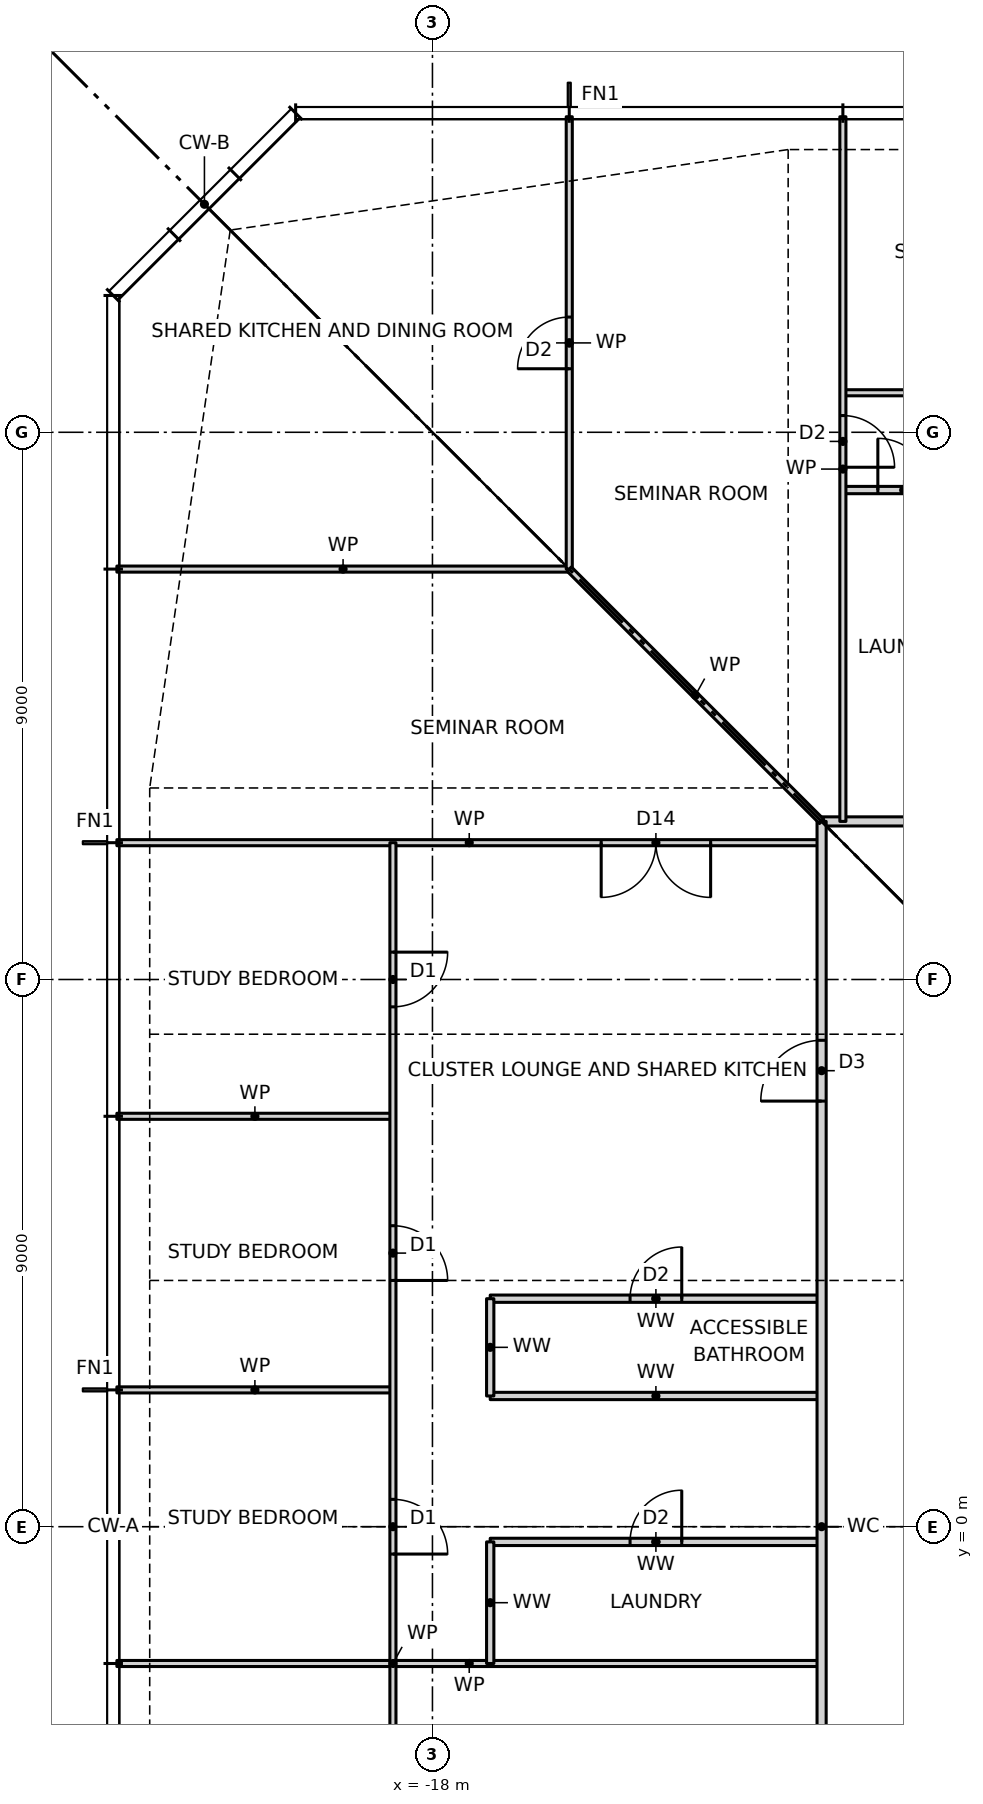
"""IFC4 building model, lengths in metres.
Left out: names, types, materials, properties, quantities, classifications, styles, units other than length and angle.
Written with IfcOpenShell. Run it as: python <this file> out.ifc"""

import sys

from ifc_helpers import new_model, si_unit, direction, frame, frame_2d, origin, place, context, subcontext, project, spatial, rectangle, extrude, element, fill, save


model = new_model("IFC4")
c1 = context("Model", 3, precision=1e-05, world=origin(), true_north=direction((0.0, 1.0)))
c2 = subcontext(c1, "Body", "Model", "MODEL_VIEW")
j1 = project(units=[si_unit("LENGTHUNIT", "METRE"), si_unit("PLANEANGLEUNIT", "RADIAN")], contexts=[c1])
p1 = place(None, origin())
s1 = spatial("IfcSite", under=j1, at=p1, CompositionType="ELEMENT")
p2 = place(p1, origin())
s2 = spatial("IfcBuilding", under=s1, at=p2, CompositionType="ELEMENT")
p3 = place(p2, frame((0.0, 0.0, 71.0)))
s3 = spatial("IfcBuildingStorey", under=s2, at=p3, CompositionType="ELEMENT", Elevation=71.0)
p4 = place(p3, frame((-23.19, -2.25, 0.0), z_axis=(0.0, 0.0, 1.0), x_axis=(1.0, 0.0, 0.0)))
e1 = element("IfcWall", 1, at=p4, inside=s3, PredefinedType="PARTITIONING", context=c2, shape_type="SweptSolid", body=[
    extrude(rectangle(XDim=11.59, YDim=0.1, at=frame_2d((5.795, 0.0))), origin(), (0.0, 0.0, 1.0), 3.2),
])
p5 = place(p3, frame((-17.05, -0.25, 0.0), z_axis=(0.0, 0.0, 1.0), x_axis=(1.0, 0.0, 0.0)))
e2 = element("IfcWall", 2, at=p5, inside=s3, PredefinedType="PARTITIONING", context=c2, shape_type="SweptSolid", body=[
    extrude(rectangle(XDim=5.45, YDim=0.12, at=frame_2d((2.725, 0.0))), origin(), (0.0, 0.0, 1.0), 3.2),
])
p6 = place(p5, frame((2.3, 0.0, 0.0)))
e3 = element("IfcOpeningElement", 3, at=p6, cuts=e2, PredefinedType="OPENING", context=c2, shape_type="SweptSolid", body=[
    extrude(rectangle(XDim=0.85, YDim=2.1, at=frame_2d((0.425, 1.05))), frame((0.0, 0.07, 0.0), z_axis=(0.0, -1.0, 0.0), x_axis=(1.0, 0.0, 0.0)), (0.0, 0.0, 1.0), 0.14),
])
p7 = place(p3, frame((-17.05, 2.15, 0.0), z_axis=(0.0, 0.0, 1.0), x_axis=(1.0, 0.0, 0.0)))
e4 = element("IfcWall", 4, at=p7, inside=s3, PredefinedType="PARTITIONING", context=c2, shape_type="SweptSolid", body=[
    extrude(rectangle(XDim=5.45, YDim=0.12, at=frame_2d((2.725, 0.0))), origin(), (0.0, 0.0, 1.0), 3.2),
])
p8 = place(p3, frame((-23.19, 2.25, 0.0), z_axis=(0.0, 0.0, 1.0), x_axis=(1.0, 0.0, 0.0)))
e5 = element("IfcWall", 5, at=p8, inside=s3, PredefinedType="PARTITIONING", context=c2, shape_type="SweptSolid", body=[
    extrude(rectangle(XDim=4.54, YDim=0.1, at=frame_2d((2.27, 0.0))), origin(), (0.0, 0.0, 1.0), 3.2),
])
p9 = place(p3, frame((-17.05, 3.75, 0.0), z_axis=(0.0, 0.0, 1.0), x_axis=(1.0, 0.0, 0.0)))
e6 = element("IfcWall", 6, at=p9, inside=s3, PredefinedType="PARTITIONING", context=c2, shape_type="SweptSolid", body=[
    extrude(rectangle(XDim=5.45, YDim=0.12, at=frame_2d((2.725, 0.0))), origin(), (0.0, 0.0, 1.0), 3.2),
])
p10 = place(p9, frame((2.3, 0.0, 0.0)))
e7 = element("IfcOpeningElement", 7, at=p10, cuts=e6, PredefinedType="OPENING", context=c2, shape_type="SweptSolid", body=[
    extrude(rectangle(XDim=0.85, YDim=2.1, at=frame_2d((0.425, 1.05))), frame((0.0, 0.07, 0.0), z_axis=(0.0, -1.0, 0.0), x_axis=(1.0, 0.0, 0.0)), (0.0, 0.0, 1.0), 0.14),
])
p11 = place(p3, frame((-23.19, 6.75, 0.0), z_axis=(0.0, 0.0, 1.0), x_axis=(1.0, 0.0, 0.0)))
e8 = element("IfcWall", 8, at=p11, inside=s3, PredefinedType="PARTITIONING", context=c2, shape_type="SweptSolid", body=[
    extrude(rectangle(XDim=4.54, YDim=0.1, at=frame_2d((2.27, 0.0))), origin(), (0.0, 0.0, 1.0), 3.2),
])
p12 = place(p3, frame((-23.19, 11.25, 0.0), z_axis=(0.0, 0.0, 1.0), x_axis=(1.0, 0.0, 0.0)))
e9 = element("IfcWall", 9, at=p12, inside=s3, PredefinedType="PARTITIONING", context=c2, shape_type="SweptSolid", body=[
    extrude(rectangle(XDim=11.59, YDim=0.1, at=frame_2d((5.795, 0.0))), origin(), (0.0, 0.0, 1.0), 3.2),
])
p13 = place(p12, frame((7.965, 0.0, 0.0)))
e10 = element("IfcOpeningElement", 10, at=p13, cuts=e9, PredefinedType="OPENING", context=c2, shape_type="SweptSolid", body=[
    extrude(rectangle(XDim=1.8, YDim=2.1, at=frame_2d((0.9, 1.05))), frame((0.0, 0.06, 0.0), z_axis=(0.0, -1.0, 0.0), x_axis=(1.0, 0.0, 0.0)), (0.0, 0.0, 1.0), 0.12),
])
p14 = place(p3, frame((-11.6, 11.6, 0.0), z_axis=(0.0, 0.0, 1.0), x_axis=(1.0, 0.0, 0.0)))
e11 = element("IfcWall", 11, at=p14, inside=s3, PredefinedType="PARTITIONING", context=c2, shape_type="SweptSolid", body=[
    extrude(rectangle(XDim=24.2, YDim=0.15, at=frame_2d((12.1, 0.0))), origin(), (0.0, 0.0, 1.0), 3.2),
])
p15 = place(p14, frame((6.15, 0.0, 0.0)))
e12 = element("IfcOpeningElement", 12, at=p15, cuts=e11, PredefinedType="OPENING", context=c2, shape_type="SweptSolid", body=[
    extrude(rectangle(XDim=1.0, YDim=2.1, at=frame_2d((0.5, 1.05))), frame((0.0, 0.085, 0.0), z_axis=(0.0, -1.0, 0.0), x_axis=(1.0, 0.0, 0.0)), (0.0, 0.0, 1.0), 0.17),
])
p16 = place(p3, frame((-23.19, 15.75, 0.0), z_axis=(0.0, 0.0, 1.0), x_axis=(1.0, 0.0, 0.0)))
e13 = element("IfcWall", 13, at=p16, inside=s3, PredefinedType="PARTITIONING", context=c2, shape_type="SweptSolid", body=[
    extrude(rectangle(XDim=7.44, YDim=0.1, at=frame_2d((3.72, 0.0))), origin(), (0.0, 0.0, 1.0), 3.2),
])
p17 = place(p3, frame((-11.25, 17.05, 0.0), z_axis=(0.0, 0.0, 1.0), x_axis=(1.0, 0.0, 0.0)))
e14 = element("IfcWall", 14, at=p17, inside=s3, PredefinedType="PARTITIONING", context=c2, shape_type="SweptSolid", body=[
    extrude(rectangle(XDim=5.1, YDim=0.12, at=frame_2d((2.55, 0.0))), origin(), (0.0, 0.0, 1.0), 3.2),
])
p18 = place(p17, frame((2.375, 0.0, 0.0)))
e15 = element("IfcOpeningElement", 15, at=p18, cuts=e14, PredefinedType="OPENING", context=c2, shape_type="SweptSolid", body=[
    extrude(rectangle(XDim=0.85, YDim=2.1, at=frame_2d((0.425, 1.05))), frame((0.0, 0.07, 0.0), z_axis=(0.0, -1.0, 0.0), x_axis=(1.0, 0.0, 0.0)), (0.0, 0.0, 1.0), 0.14),
])
p19 = place(p17, frame((0.575, 0.0, 0.0)))
e16 = element("IfcOpeningElement", 16, at=p19, cuts=e14, PredefinedType="OPENING", context=c2, shape_type="SweptSolid", body=[
    extrude(rectangle(XDim=0.85, YDim=2.1, at=frame_2d((0.425, 1.05))), frame((0.0, 0.07, 0.0), z_axis=(0.0, -1.0, 0.0), x_axis=(1.0, 0.0, 0.0)), (0.0, 0.0, 1.0), 0.14),
])
p20 = place(p3, frame((-11.25, 18.65, 0.0), z_axis=(0.0, 0.0, 1.0), x_axis=(1.0, 0.0, 0.0)))
e17 = element("IfcWall", 17, at=p20, inside=s3, PredefinedType="PARTITIONING", context=c2, shape_type="SweptSolid", body=[
    extrude(rectangle(XDim=27.0, YDim=0.1, at=frame_2d((13.5, 0.0))), origin(), (0.0, 0.0, 1.0), 3.2),
])
p21 = place(p20, frame((24.3, 0.0, 0.0)))
e18 = element("IfcOpeningElement", 18, at=p21, cuts=e17, PredefinedType="OPENING", context=c2, shape_type="SweptSolid", body=[
    extrude(rectangle(XDim=0.9, YDim=2.1, at=frame_2d((0.45, 1.05))), frame((0.0, 0.06, 0.0), z_axis=(0.0, -1.0, 0.0), x_axis=(1.0, 0.0, 0.0)), (0.0, 0.0, 1.0), 0.12),
])
p22 = place(p20, frame((19.8, 0.0, 0.0)))
e19 = element("IfcOpeningElement", 19, at=p22, cuts=e17, PredefinedType="OPENING", context=c2, shape_type="SweptSolid", body=[
    extrude(rectangle(XDim=0.9, YDim=2.1, at=frame_2d((0.45, 1.05))), frame((0.0, 0.06, 0.0), z_axis=(0.0, -1.0, 0.0), x_axis=(1.0, 0.0, 0.0)), (0.0, 0.0, 1.0), 0.12),
])
p23 = place(p20, frame((15.3, 0.0, 0.0)))
e20 = element("IfcOpeningElement", 20, at=p23, cuts=e17, PredefinedType="OPENING", context=c2, shape_type="SweptSolid", body=[
    extrude(rectangle(XDim=0.9, YDim=2.1, at=frame_2d((0.45, 1.05))), frame((0.0, 0.06, 0.0), z_axis=(0.0, -1.0, 0.0), x_axis=(1.0, 0.0, 0.0)), (0.0, 0.0, 1.0), 0.12),
])
p24 = place(p20, frame((10.8, 0.0, 0.0)))
e21 = element("IfcOpeningElement", 21, at=p24, cuts=e17, PredefinedType="OPENING", context=c2, shape_type="SweptSolid", body=[
    extrude(rectangle(XDim=0.9, YDim=2.1, at=frame_2d((0.45, 1.05))), frame((0.0, 0.06, 0.0), z_axis=(0.0, -1.0, 0.0), x_axis=(1.0, 0.0, 0.0)), (0.0, 0.0, 1.0), 0.12),
])
p25 = place(p20, frame((6.3, 0.0, 0.0)))
e22 = element("IfcOpeningElement", 22, at=p25, cuts=e17, PredefinedType="OPENING", context=c2, shape_type="SweptSolid", body=[
    extrude(rectangle(XDim=0.9, YDim=2.1, at=frame_2d((0.45, 1.05))), frame((0.0, 0.06, 0.0), z_axis=(0.0, -1.0, 0.0), x_axis=(1.0, 0.0, 0.0)), (0.0, 0.0, 1.0), 0.12),
])
p26 = place(p20, frame((1.8, 0.0, 0.0)))
e23 = element("IfcOpeningElement", 23, at=p26, cuts=e17, PredefinedType="OPENING", context=c2, shape_type="SweptSolid", body=[
    extrude(rectangle(XDim=0.9, YDim=2.1, at=frame_2d((0.45, 1.05))), frame((0.0, 0.06, 0.0), z_axis=(0.0, -1.0, 0.0), x_axis=(1.0, 0.0, 0.0)), (0.0, 0.0, 1.0), 0.12),
])
p27 = place(p3, frame((-11.25, 11.6, 0.0), z_axis=(0.0, 0.0, 1.0), x_axis=(0.0, 1.0, 0.0)))
e24 = element("IfcWall", 24, at=p27, inside=s3, PredefinedType="PARTITIONING", context=c2, shape_type="SweptSolid", body=[
    extrude(rectangle(XDim=11.59, YDim=0.1, at=frame_2d((5.795, 0.0))), origin(), (0.0, 0.0, 1.0), 3.2),
])
p28 = place(p27, frame((5.825, 0.0, 0.0)))
e25 = element("IfcOpeningElement", 25, at=p28, cuts=e24, PredefinedType="OPENING", context=c2, shape_type="SweptSolid", body=[
    extrude(rectangle(XDim=0.85, YDim=2.1, at=frame_2d((0.425, 1.05))), frame((0.0, 0.06, 0.0), z_axis=(0.0, -1.0, 0.0), x_axis=(1.0, 0.0, 0.0)), (0.0, 0.0, 1.0), 0.12),
])
p29 = place(p3, frame((-11.6, -11.6, 0.0), z_axis=(0.0, 0.0, 1.0), x_axis=(0.0, 1.0, 0.0)))
e26 = element("IfcWall", 26, at=p29, inside=s3, PredefinedType="PARTITIONING", context=c2, shape_type="SweptSolid", body=[
    extrude(rectangle(XDim=23.2, YDim=0.15, at=frame_2d((11.6, 0.0))), origin(), (0.0, 0.0, 1.0), 3.2),
])
p30 = place(p29, frame((18.6, 0.0, 0.0)))
e27 = element("IfcOpeningElement", 27, at=p30, cuts=e26, PredefinedType="OPENING", context=c2, shape_type="SweptSolid", body=[
    extrude(rectangle(XDim=1.0, YDim=2.1, at=frame_2d((0.5, 1.05))), frame((0.0, 0.085, 0.0), z_axis=(0.0, -1.0, 0.0), x_axis=(1.0, 0.0, 0.0)), (0.0, 0.0, 1.0), 0.17),
])
p31 = place(p29, frame((1.175, 0.0, 0.0)))
e28 = element("IfcOpeningElement", 28, at=p31, cuts=e26, PredefinedType="OPENING", context=c2, shape_type="SweptSolid", body=[
    extrude(rectangle(XDim=1.0, YDim=2.1, at=frame_2d((0.5, 1.05))), frame((0.0, 0.085, 0.0), z_axis=(0.0, -1.0, 0.0), x_axis=(1.0, 0.0, 0.0)), (0.0, 0.0, 1.0), 0.17),
])
p32 = place(p3, frame((-15.75, 15.75, 0.0), z_axis=(0.0, 0.0, 1.0), x_axis=(0.0, 1.0, 0.0)))
e29 = element("IfcWall", 29, at=p32, inside=s3, PredefinedType="PARTITIONING", context=c2, shape_type="SweptSolid", body=[
    extrude(rectangle(XDim=7.44, YDim=0.1, at=frame_2d((3.72, 0.0))), origin(), (0.0, 0.0, 1.0), 3.2),
])
p33 = place(p32, frame((3.295, 0.0, 0.0)))
e30 = element("IfcOpeningElement", 30, at=p33, cuts=e29, PredefinedType="OPENING", context=c2, shape_type="SweptSolid", body=[
    extrude(rectangle(XDim=0.85, YDim=2.1, at=frame_2d((0.425, 1.05))), frame((0.0, 0.06, 0.0), z_axis=(0.0, -1.0, 0.0), x_axis=(1.0, 0.0, 0.0)), (0.0, 0.0, 1.0), 0.12),
])
p34 = place(p3, frame((-17.05, -2.25, 0.0), z_axis=(0.0, 0.0, 1.0), x_axis=(0.0, 1.0, 0.0)))
e31 = element("IfcWall", 31, at=p34, inside=s3, PredefinedType="PARTITIONING", context=c2, shape_type="SweptSolid", body=[
    extrude(rectangle(XDim=2.0, YDim=0.12, at=frame_2d((1.0, 0.0))), origin(), (0.0, 0.0, 1.0), 3.2),
])
p35 = place(p3, frame((-17.05, 2.15, 0.0), z_axis=(0.0, 0.0, 1.0), x_axis=(0.0, 1.0, 0.0)))
e32 = element("IfcWall", 32, at=p35, inside=s3, PredefinedType="PARTITIONING", context=c2, shape_type="SweptSolid", body=[
    extrude(rectangle(XDim=1.6, YDim=0.12, at=frame_2d((0.8, 0.0))), origin(), (0.0, 0.0, 1.0), 3.2),
])
p36 = place(p3, frame((-18.65, -15.75, 0.0), z_axis=(0.0, 0.0, 1.0), x_axis=(0.0, 1.0, 0.0)))
e33 = element("IfcWall", 33, at=p36, inside=s3, PredefinedType="PARTITIONING", context=c2, shape_type="SweptSolid", body=[
    extrude(rectangle(XDim=27.0, YDim=0.1, at=frame_2d((13.5, 0.0))), origin(), (0.0, 0.0, 1.0), 3.0),
])
p37 = place(p36, frame((24.3, 0.0, 0.0)))
e34 = element("IfcOpeningElement", 34, at=p37, cuts=e33, PredefinedType="OPENING", context=c2, shape_type="SweptSolid", body=[
    extrude(rectangle(XDim=0.9, YDim=2.1, at=frame_2d((0.45, 1.05))), frame((0.0, 0.06, 0.0), z_axis=(0.0, -1.0, 0.0), x_axis=(1.0, 0.0, 0.0)), (0.0, 0.0, 1.0), 0.12),
])
p38 = place(p36, frame((19.8, 0.0, 0.0)))
e35 = element("IfcOpeningElement", 35, at=p38, cuts=e33, PredefinedType="OPENING", context=c2, shape_type="SweptSolid", body=[
    extrude(rectangle(XDim=0.9, YDim=2.1, at=frame_2d((0.45, 1.05))), frame((0.0, 0.06, 0.0), z_axis=(0.0, -1.0, 0.0), x_axis=(1.0, 0.0, 0.0)), (0.0, 0.0, 1.0), 0.12),
])
p39 = place(p36, frame((15.3, 0.0, 0.0)))
e36 = element("IfcOpeningElement", 36, at=p39, cuts=e33, PredefinedType="OPENING", context=c2, shape_type="SweptSolid", body=[
    extrude(rectangle(XDim=0.9, YDim=2.1, at=frame_2d((0.45, 1.05))), frame((0.0, 0.06, 0.0), z_axis=(0.0, -1.0, 0.0), x_axis=(1.0, 0.0, 0.0)), (0.0, 0.0, 1.0), 0.12),
])
p40 = place(p36, frame((10.8, 0.0, 0.0)))
e37 = element("IfcOpeningElement", 37, at=p40, cuts=e33, PredefinedType="OPENING", context=c2, shape_type="SweptSolid", body=[
    extrude(rectangle(XDim=0.9, YDim=2.1, at=frame_2d((0.45, 1.05))), frame((0.0, 0.06, 0.0), z_axis=(0.0, -1.0, 0.0), x_axis=(1.0, 0.0, 0.0)), (0.0, 0.0, 1.0), 0.12),
])
p41 = place(p36, frame((6.3, 0.0, 0.0)))
e38 = element("IfcOpeningElement", 38, at=p41, cuts=e33, PredefinedType="OPENING", context=c2, shape_type="SweptSolid", body=[
    extrude(rectangle(XDim=0.9, YDim=2.1, at=frame_2d((0.45, 1.05))), frame((0.0, 0.06, 0.0), z_axis=(0.0, -1.0, 0.0), x_axis=(1.0, 0.0, 0.0)), (0.0, 0.0, 1.0), 0.12),
])
p42 = place(p36, frame((1.8, 0.0, 0.0)))
e39 = element("IfcOpeningElement", 39, at=p42, cuts=e33, PredefinedType="OPENING", context=c2, shape_type="SweptSolid", body=[
    extrude(rectangle(XDim=0.9, YDim=2.1, at=frame_2d((0.45, 1.05))), frame((0.0, 0.06, 0.0), z_axis=(0.0, -1.0, 0.0), x_axis=(1.0, 0.0, 0.0)), (0.0, 0.0, 1.0), 0.12),
])
p43 = place(p3, frame((-11.6, 11.6, 0.0), z_axis=(0.0, 0.0, 1.0), x_axis=(-0.707106781187, 0.707106781187, 0.0)))
e40 = element("IfcWall", 40, at=p43, inside=s3, PredefinedType="PARTITIONING", context=c2, shape_type="SweptSolid", body=[
    extrude(rectangle(XDim=5.869, YDim=0.1, at=frame_2d((2.935, 0.0))), origin(), (0.0, 0.0, 1.0), 3.2),
])
p44 = place(p19, origin())
e41 = element("IfcDoor", 41, at=p44, inside=s3, OperationType="SINGLE_SWING_LEFT", PredefinedType="DOOR", context=c2, shape_type="SweptSolid", body=[
    extrude(rectangle(XDim=0.85, YDim=2.1, at=frame_2d((0.425, 1.05))), frame((0.0, 0.025, 0.0), z_axis=(0.0, -1.0, 0.0), x_axis=(1.0, 0.0, 0.0)), (0.0, 0.0, 1.0), 0.05),
])
fill(e16, e41)
p45 = place(p28, frame((0.85, 0.0, 0.0), z_axis=(0.0, 0.0, 1.0), x_axis=(-1.0, 0.0, 0.0)))
e42 = element("IfcDoor", 42, at=p45, inside=s3, OperationType="SINGLE_SWING_RIGHT", PredefinedType="DOOR", context=c2, shape_type="SweptSolid", body=[
    extrude(rectangle(XDim=0.85, YDim=2.1, at=frame_2d((0.425, 1.05))), frame((0.0, 0.025, 0.0), z_axis=(0.0, -1.0, 0.0), x_axis=(1.0, 0.0, 0.0)), (0.0, 0.0, 1.0), 0.05),
])
fill(e25, e42)
p46 = place(p13, frame((1.8, 0.0, 0.0), z_axis=(0.0, 0.0, 1.0), x_axis=(-1.0, 0.0, 0.0)))
e43 = element("IfcDoor", 43, at=p46, inside=s3, OperationType="DOUBLE_DOOR_SINGLE_SWING", PredefinedType="DOOR", context=c2, shape_type="SweptSolid", body=[
    extrude(rectangle(XDim=1.8, YDim=2.1, at=frame_2d((0.9, 1.05))), frame((0.0, 0.025, 0.0), z_axis=(0.0, -1.0, 0.0), x_axis=(1.0, 0.0, 0.0)), (0.0, 0.0, 1.0), 0.05),
])
fill(e10, e43)
p47 = place(p37, frame((0.9, 0.0, 0.0), z_axis=(0.0, 0.0, 1.0), x_axis=(-1.0, 0.0, 0.0)))
e44 = element("IfcDoor", 44, at=p47, inside=s3, OperationType="SINGLE_SWING_LEFT", PredefinedType="DOOR", context=c2, shape_type="SweptSolid", body=[
    extrude(rectangle(XDim=0.9, YDim=2.1, at=frame_2d((0.45, 1.05))), frame((0.0, 0.025, 0.0), z_axis=(0.0, -1.0, 0.0), x_axis=(1.0, 0.0, 0.0)), (0.0, 0.0, 1.0), 0.05),
])
fill(e34, e44)
p48 = place(p38, frame((0.9, 0.0, 0.0), z_axis=(0.0, 0.0, 1.0), x_axis=(-1.0, 0.0, 0.0)))
e45 = element("IfcDoor", 45, at=p48, inside=s3, OperationType="SINGLE_SWING_RIGHT", PredefinedType="DOOR", context=c2, shape_type="SweptSolid", body=[
    extrude(rectangle(XDim=0.9, YDim=2.1, at=frame_2d((0.45, 1.05))), frame((0.0, 0.025, 0.0), z_axis=(0.0, -1.0, 0.0), x_axis=(1.0, 0.0, 0.0)), (0.0, 0.0, 1.0), 0.05),
])
fill(e35, e45)
p49 = place(p39, frame((0.9, 0.0, 0.0), z_axis=(0.0, 0.0, 1.0), x_axis=(-1.0, 0.0, 0.0)))
e46 = element("IfcDoor", 46, at=p49, inside=s3, OperationType="SINGLE_SWING_RIGHT", PredefinedType="DOOR", context=c2, shape_type="SweptSolid", body=[
    extrude(rectangle(XDim=0.9, YDim=2.1, at=frame_2d((0.45, 1.05))), frame((0.0, 0.025, 0.0), z_axis=(0.0, -1.0, 0.0), x_axis=(1.0, 0.0, 0.0)), (0.0, 0.0, 1.0), 0.05),
])
fill(e36, e46)
p50 = place(p30, origin())
e47 = element("IfcDoor", 47, at=p50, inside=s3, OperationType="SINGLE_SWING_LEFT", PredefinedType="DOOR", context=c2, shape_type="SweptSolid", body=[
    extrude(rectangle(XDim=1.0, YDim=2.1, at=frame_2d((0.5, 1.05))), frame((0.0, 0.025, 0.0), z_axis=(0.0, -1.0, 0.0), x_axis=(1.0, 0.0, 0.0)), (0.0, 0.0, 1.0), 0.05),
])
fill(e27, e47)
p51 = place(p10, origin())
e48 = element("IfcDoor", 48, at=p51, inside=s3, OperationType="SINGLE_SWING_RIGHT", PredefinedType="DOOR", context=c2, shape_type="SweptSolid", body=[
    extrude(rectangle(XDim=0.85, YDim=2.1, at=frame_2d((0.425, 1.05))), frame((0.0, 0.025, 0.0), z_axis=(0.0, -1.0, 0.0), x_axis=(1.0, 0.0, 0.0)), (0.0, 0.0, 1.0), 0.05),
])
fill(e7, e48)
p52 = place(p6, origin())
e49 = element("IfcDoor", 49, at=p52, inside=s3, OperationType="SINGLE_SWING_RIGHT", PredefinedType="DOOR", context=c2, shape_type="SweptSolid", body=[
    extrude(rectangle(XDim=0.85, YDim=2.1, at=frame_2d((0.425, 1.05))), frame((0.0, 0.025, 0.0), z_axis=(0.0, -1.0, 0.0), x_axis=(1.0, 0.0, 0.0)), (0.0, 0.0, 1.0), 0.05),
])
fill(e3, e49)
p53 = place(p33, origin())
e50 = element("IfcDoor", 50, at=p53, inside=s3, OperationType="SINGLE_SWING_LEFT", PredefinedType="DOOR", context=c2, shape_type="SweptSolid", body=[
    extrude(rectangle(XDim=0.85, YDim=2.1, at=frame_2d((0.425, 1.05))), frame((0.0, 0.025, 0.0), z_axis=(0.0, -1.0, 0.0), x_axis=(1.0, 0.0, 0.0)), (0.0, 0.0, 1.0), 0.05),
])
fill(e30, e50)
save(model, sys.argv[1])
